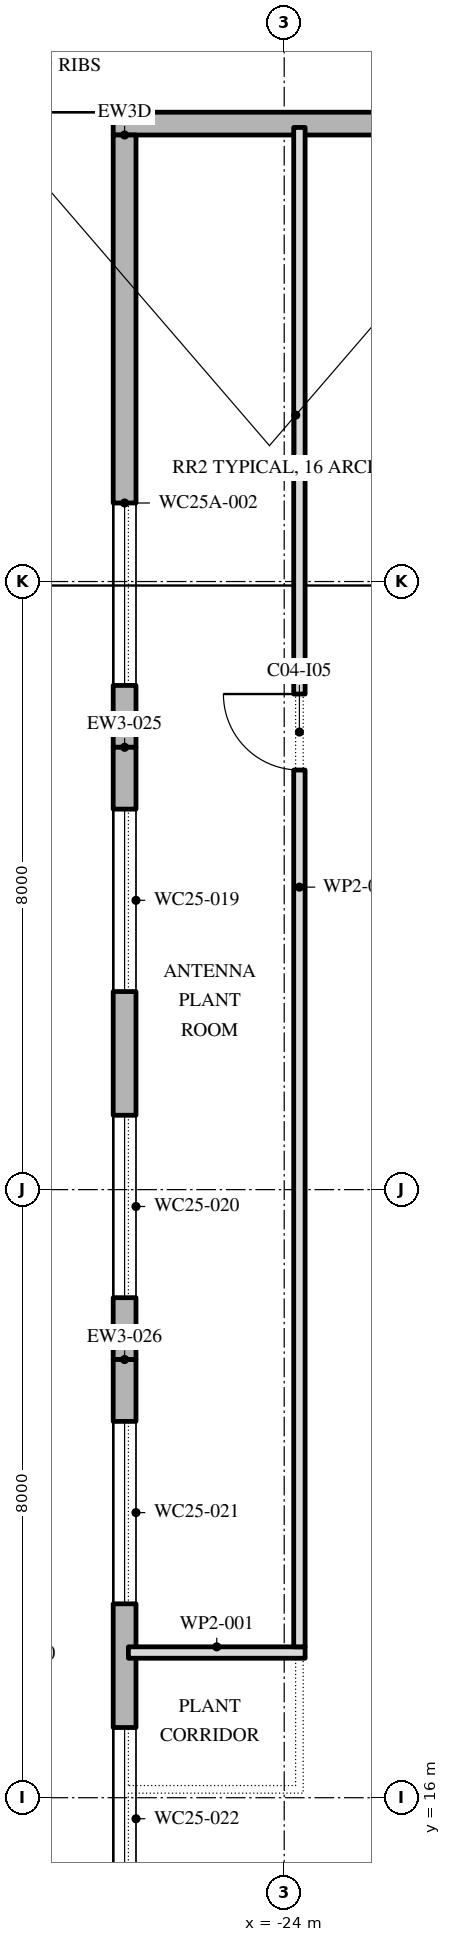
"""IFC4 building model, lengths in metres.
Left out: names, types, materials, properties, quantities, classifications, styles, units other than length and angle.
Written with IfcOpenShell. Run it as: python <this file> out.ifc"""

import sys

from ifc_helpers import new_model, si_unit, direction, frame, frame_2d, origin, place, context, subcontext, project, spatial, polyline, rectangle, outline, extrude, element, fill, save


model = new_model("IFC4")
c1 = context("Model", 3, precision=1e-05, world=origin(), true_north=direction((0.0, 1.0)))
c2 = subcontext(c1, "Body", "Model", "MODEL_VIEW")
j1 = project(units=[si_unit("LENGTHUNIT", "METRE"), si_unit("PLANEANGLEUNIT", "RADIAN")], contexts=[c1])
p1 = place(None, origin())
s1 = spatial("IfcSite", under=j1, at=p1, CompositionType="ELEMENT")
p2 = place(p1, origin())
s2 = spatial("IfcBuilding", under=s1, at=p2, CompositionType="ELEMENT")
p3 = place(p2, frame((0.0, 0.0, 381.6)))
s3 = spatial("IfcBuildingStorey", under=s2, at=p3, CompositionType="ELEMENT", Elevation=381.6)
p4 = place(p3, frame((-17.55, 38.024, 0.0), z_axis=(0.0, 0.0, 1.0), x_axis=(-1.0, 0.0, 0.0)))
e1 = element("IfcWall", 1, at=p4, inside=s3, PredefinedType="STANDARD", context=c2, shape_type="SweptSolid", body=[
    extrude(rectangle(XDim=8.7, YDim=0.3, at=frame_2d((4.35, 0.0))), origin(), (0.0, 0.0, 1.0), 2.199),
])
p5 = place(p3, frame((-26.1, 37.875, 0.0), z_axis=(0.0, 0.0, 1.0), x_axis=(0.0, -1.0, 0.0)))
e2 = element("IfcWall", 2, at=p5, inside=s3, PredefinedType="STANDARD", context=c2, shape_type="SweptSolid", body=[
    extrude(outline(polyline([(0.0, 0.0), (8.055, 0.0), (8.055, 4.0), (5.927, 4.0), (5.927, 6.298), (5.907, 6.285), (2.519, 4.0), (0.0, 2.301), (0.0, 0.0)])), frame((0.0, 0.15, 0.0), z_axis=(0.0, -1.0, 0.0), x_axis=(1.0, 0.0, 0.0)), (0.0, 0.0, 1.0), 0.3),
])
p6 = place(p5, frame((4.841, 0.0, 0.8)))
e3 = element("IfcOpeningElement", 3, at=p6, cuts=e2, PredefinedType="OPENING", context=c2, shape_type="SweptSolid", body=[
    extrude(outline(polyline([(0.0, 0.0), (2.4, 0.0), (2.4, 0.85), (2.377, 1.088), (2.31, 1.317), (2.2, 1.529), (2.051, 1.717), (1.87, 1.872), (1.663, 1.991), (1.437, 2.068), (1.2, 2.1), (0.963, 2.068), (0.737, 1.991), (0.53, 1.872), (0.349, 1.717), (0.2, 1.529), (0.09, 1.317), (0.023, 1.088), (0.0, 0.85), (0.0, 0.0)])), frame((0.0, 0.16, 0.0), z_axis=(0.0, -1.0, 0.0), x_axis=(1.0, 0.0, 0.0)), (0.0, 0.0, 1.0), 0.32),
])
p7 = place(p3, frame((-26.1, 29.82, 0.0), z_axis=(0.0, 0.0, 1.0), x_axis=(0.0, -1.0, 0.0)))
e4 = element("IfcWall", 4, at=p7, inside=s3, PredefinedType="STANDARD", context=c2, shape_type="SweptSolid", body=[
    extrude(rectangle(XDim=8.055, YDim=0.3, at=frame_2d((4.027, 0.0))), origin(), (0.0, 0.0, 1.0), 4.0),
])
p8 = place(p7, frame((0.814, 0.0, 0.8)))
e5 = element("IfcOpeningElement", 5, at=p8, cuts=e4, PredefinedType="OPENING", context=c2, shape_type="SweptSolid", body=[
    extrude(outline(polyline([(0.0, 0.0), (2.4, 0.0), (2.4, 1.25), (2.377, 1.488), (2.31, 1.717), (2.2, 1.929), (2.051, 2.116), (1.87, 2.272), (1.663, 2.391), (1.437, 2.468), (1.2, 2.5), (0.963, 2.468), (0.737, 2.391), (0.53, 2.272), (0.349, 2.116), (0.2, 1.929), (0.09, 1.717), (0.023, 1.488), (0.0, 1.25), (0.0, 0.0)])), frame((0.0, 0.16, 0.0), z_axis=(0.0, -1.0, 0.0), x_axis=(1.0, 0.0, 0.0)), (0.0, 0.0, 1.0), 0.32),
])
p9 = place(p7, frame((4.841, 0.0, 0.8)))
e6 = element("IfcOpeningElement", 6, at=p9, cuts=e4, PredefinedType="OPENING", context=c2, shape_type="SweptSolid", body=[
    extrude(outline(polyline([(0.0, 0.0), (2.4, 0.0), (2.4, 1.25), (2.377, 1.488), (2.31, 1.717), (2.2, 1.929), (2.051, 2.116), (1.87, 2.272), (1.663, 2.391), (1.437, 2.468), (1.2, 2.5), (0.963, 2.468), (0.737, 2.391), (0.53, 2.272), (0.349, 2.116), (0.2, 1.929), (0.09, 1.717), (0.023, 1.488), (0.0, 1.25), (0.0, 0.0)])), frame((0.0, 0.16, 0.0), z_axis=(0.0, -1.0, 0.0), x_axis=(1.0, 0.0, 0.0)), (0.0, 0.0, 1.0), 0.32),
])
p10 = place(p3, frame((-26.1, 21.765, 0.0), z_axis=(0.0, 0.0, 1.0), x_axis=(0.0, -1.0, 0.0)))
e7 = element("IfcWall", 7, at=p10, inside=s3, PredefinedType="STANDARD", context=c2, shape_type="SweptSolid", body=[
    extrude(rectangle(XDim=8.055, YDim=0.3, at=frame_2d((4.027, 0.0))), origin(), (0.0, 0.0, 1.0), 4.0),
])
p11 = place(p10, frame((0.814, 0.0, 0.8)))
e8 = element("IfcOpeningElement", 8, at=p11, cuts=e7, PredefinedType="OPENING", context=c2, shape_type="SweptSolid", body=[
    extrude(outline(polyline([(0.0, 0.0), (2.4, 0.0), (2.4, 1.25), (2.377, 1.488), (2.31, 1.717), (2.2, 1.929), (2.051, 2.116), (1.87, 2.272), (1.663, 2.391), (1.437, 2.468), (1.2, 2.5), (0.963, 2.468), (0.737, 2.391), (0.53, 2.272), (0.349, 2.116), (0.2, 1.929), (0.09, 1.717), (0.023, 1.488), (0.0, 1.25), (0.0, 0.0)])), frame((0.0, 0.16, 0.0), z_axis=(0.0, -1.0, 0.0), x_axis=(1.0, 0.0, 0.0)), (0.0, 0.0, 1.0), 0.32),
])
p12 = place(p10, frame((4.841, 0.0, 0.8)))
e9 = element("IfcOpeningElement", 9, at=p12, cuts=e7, PredefinedType="OPENING", context=c2, shape_type="SweptSolid", body=[
    extrude(outline(polyline([(0.0, 0.0), (2.4, 0.0), (2.4, 1.25), (2.377, 1.488), (2.31, 1.717), (2.2, 1.929), (2.051, 2.116), (1.87, 2.272), (1.663, 2.391), (1.437, 2.468), (1.2, 2.5), (0.963, 2.468), (0.737, 2.391), (0.53, 2.272), (0.349, 2.116), (0.2, 1.929), (0.09, 1.717), (0.023, 1.488), (0.0, 1.25), (0.0, 0.0)])), frame((0.0, 0.16, 0.0), z_axis=(0.0, -1.0, 0.0), x_axis=(1.0, 0.0, 0.0)), (0.0, 0.0, 1.0), 0.32),
])
p13 = place(p3, frame((-26.05, 17.91, 0.0), z_axis=(0.0, 0.0, 1.0), x_axis=(1.0, 0.0, 0.0)))
e10 = element("IfcWall", 10, at=p13, inside=s3, PredefinedType="PARTITIONING", context=c2, shape_type="SweptSolid", body=[
    extrude(rectangle(XDim=2.325, YDim=0.15, at=frame_2d((1.163, 0.0))), origin(), (0.0, 0.0, 1.0), 4.0),
])
p14 = place(p3, frame((-23.8, 17.985, 0.0), z_axis=(0.0, 0.0, 1.0), x_axis=(0.0, 1.0, 0.0)))
e11 = element("IfcWall", 11, at=p14, inside=s3, PredefinedType="PARTITIONING", context=c2, shape_type="SweptSolid", body=[
    extrude(rectangle(XDim=19.989, YDim=0.15, at=frame_2d((9.995, 0.0))), origin(), (0.0, 0.0, 1.0), 4.0),
])
p15 = place(p14, frame((11.535, 0.0, 0.0)))
e12 = element("IfcOpeningElement", 12, at=p15, cuts=e11, PredefinedType="OPENING", context=c2, shape_type="SweptSolid", body=[
    extrude(rectangle(XDim=1.0, YDim=2.1, at=frame_2d((0.5, 1.05))), frame((0.0, 0.085, 0.0), z_axis=(0.0, -1.0, 0.0), x_axis=(1.0, 0.0, 0.0)), (0.0, 0.0, 1.0), 0.17),
])
p16 = place(p6, origin())
e13 = element("IfcWindow", 13, at=p16, inside=s3, PartitioningType="DOUBLE_PANEL_VERTICAL", PredefinedType="WINDOW", context=c2, shape_type="SweptSolid", body=[
    extrude(outline(polyline([(0.0, 0.0), (2.4, 0.0), (2.4, 0.85), (2.377, 1.088), (2.31, 1.317), (2.2, 1.529), (2.051, 1.717), (1.87, 1.872), (1.663, 1.991), (1.437, 2.068), (1.2, 2.1), (0.963, 2.068), (0.737, 1.991), (0.53, 1.872), (0.349, 1.717), (0.2, 1.529), (0.09, 1.317), (0.023, 1.088), (0.0, 0.85), (0.0, 0.0)])), frame((0.0, 0.03, 0.0), z_axis=(0.0, -1.0, 0.0), x_axis=(1.0, 0.0, 0.0)), (0.0, 0.0, 1.0), 0.06),
])
fill(e3, e13)
p17 = place(p8, origin())
e14 = element("IfcWindow", 14, at=p17, inside=s3, PartitioningType="DOUBLE_PANEL_VERTICAL", PredefinedType="WINDOW", context=c2, shape_type="SweptSolid", body=[
    extrude(outline(polyline([(0.0, 0.0), (2.4, 0.0), (2.4, 1.25), (2.377, 1.488), (2.31, 1.717), (2.2, 1.929), (2.051, 2.116), (1.87, 2.272), (1.663, 2.391), (1.437, 2.468), (1.2, 2.5), (0.963, 2.468), (0.737, 2.391), (0.53, 2.272), (0.349, 2.116), (0.2, 1.929), (0.09, 1.717), (0.023, 1.488), (0.0, 1.25), (0.0, 0.0)])), frame((0.0, 0.03, 0.0), z_axis=(0.0, -1.0, 0.0), x_axis=(1.0, 0.0, 0.0)), (0.0, 0.0, 1.0), 0.06),
])
fill(e5, e14)
p18 = place(p9, origin())
e15 = element("IfcWindow", 15, at=p18, inside=s3, PartitioningType="DOUBLE_PANEL_VERTICAL", PredefinedType="WINDOW", context=c2, shape_type="SweptSolid", body=[
    extrude(outline(polyline([(0.0, 0.0), (2.4, 0.0), (2.4, 1.25), (2.377, 1.488), (2.31, 1.717), (2.2, 1.929), (2.051, 2.116), (1.87, 2.272), (1.663, 2.391), (1.437, 2.468), (1.2, 2.5), (0.963, 2.468), (0.737, 2.391), (0.53, 2.272), (0.349, 2.116), (0.2, 1.929), (0.09, 1.717), (0.023, 1.488), (0.0, 1.25), (0.0, 0.0)])), frame((0.0, 0.03, 0.0), z_axis=(0.0, -1.0, 0.0), x_axis=(1.0, 0.0, 0.0)), (0.0, 0.0, 1.0), 0.06),
])
fill(e6, e15)
p19 = place(p11, origin())
e16 = element("IfcWindow", 16, at=p19, inside=s3, PartitioningType="DOUBLE_PANEL_VERTICAL", PredefinedType="WINDOW", context=c2, shape_type="SweptSolid", body=[
    extrude(outline(polyline([(0.0, 0.0), (2.4, 0.0), (2.4, 1.25), (2.377, 1.488), (2.31, 1.717), (2.2, 1.929), (2.051, 2.116), (1.87, 2.272), (1.663, 2.391), (1.437, 2.468), (1.2, 2.5), (0.963, 2.468), (0.737, 2.391), (0.53, 2.272), (0.349, 2.116), (0.2, 1.929), (0.09, 1.717), (0.023, 1.488), (0.0, 1.25), (0.0, 0.0)])), frame((0.0, 0.03, 0.0), z_axis=(0.0, -1.0, 0.0), x_axis=(1.0, 0.0, 0.0)), (0.0, 0.0, 1.0), 0.06),
])
fill(e8, e16)
p20 = place(p12, origin())
e17 = element("IfcWindow", 17, at=p20, inside=s3, PartitioningType="DOUBLE_PANEL_VERTICAL", PredefinedType="WINDOW", context=c2, shape_type="SweptSolid", body=[
    extrude(outline(polyline([(0.0, 0.0), (2.4, 0.0), (2.4, 1.25), (2.377, 1.488), (2.31, 1.717), (2.2, 1.929), (2.051, 2.116), (1.87, 2.272), (1.663, 2.391), (1.437, 2.468), (1.2, 2.5), (0.963, 2.468), (0.737, 2.391), (0.53, 2.272), (0.349, 2.116), (0.2, 1.929), (0.09, 1.717), (0.023, 1.488), (0.0, 1.25), (0.0, 0.0)])), frame((0.0, 0.03, 0.0), z_axis=(0.0, -1.0, 0.0), x_axis=(1.0, 0.0, 0.0)), (0.0, 0.0, 1.0), 0.06),
])
fill(e9, e17)
p21 = place(p15, origin())
e18 = element("IfcDoor", 18, at=p21, inside=s3, OperationType="SINGLE_SWING_LEFT", PredefinedType="DOOR", context=c2, shape_type="SweptSolid", body=[
    extrude(rectangle(XDim=1.0, YDim=2.1, at=frame_2d((0.5, 1.05))), frame((0.0, 0.025, 0.0), z_axis=(0.0, -1.0, 0.0), x_axis=(1.0, 0.0, 0.0)), (0.0, 0.0, 1.0), 0.05),
])
fill(e12, e18)
save(model, sys.argv[1])
